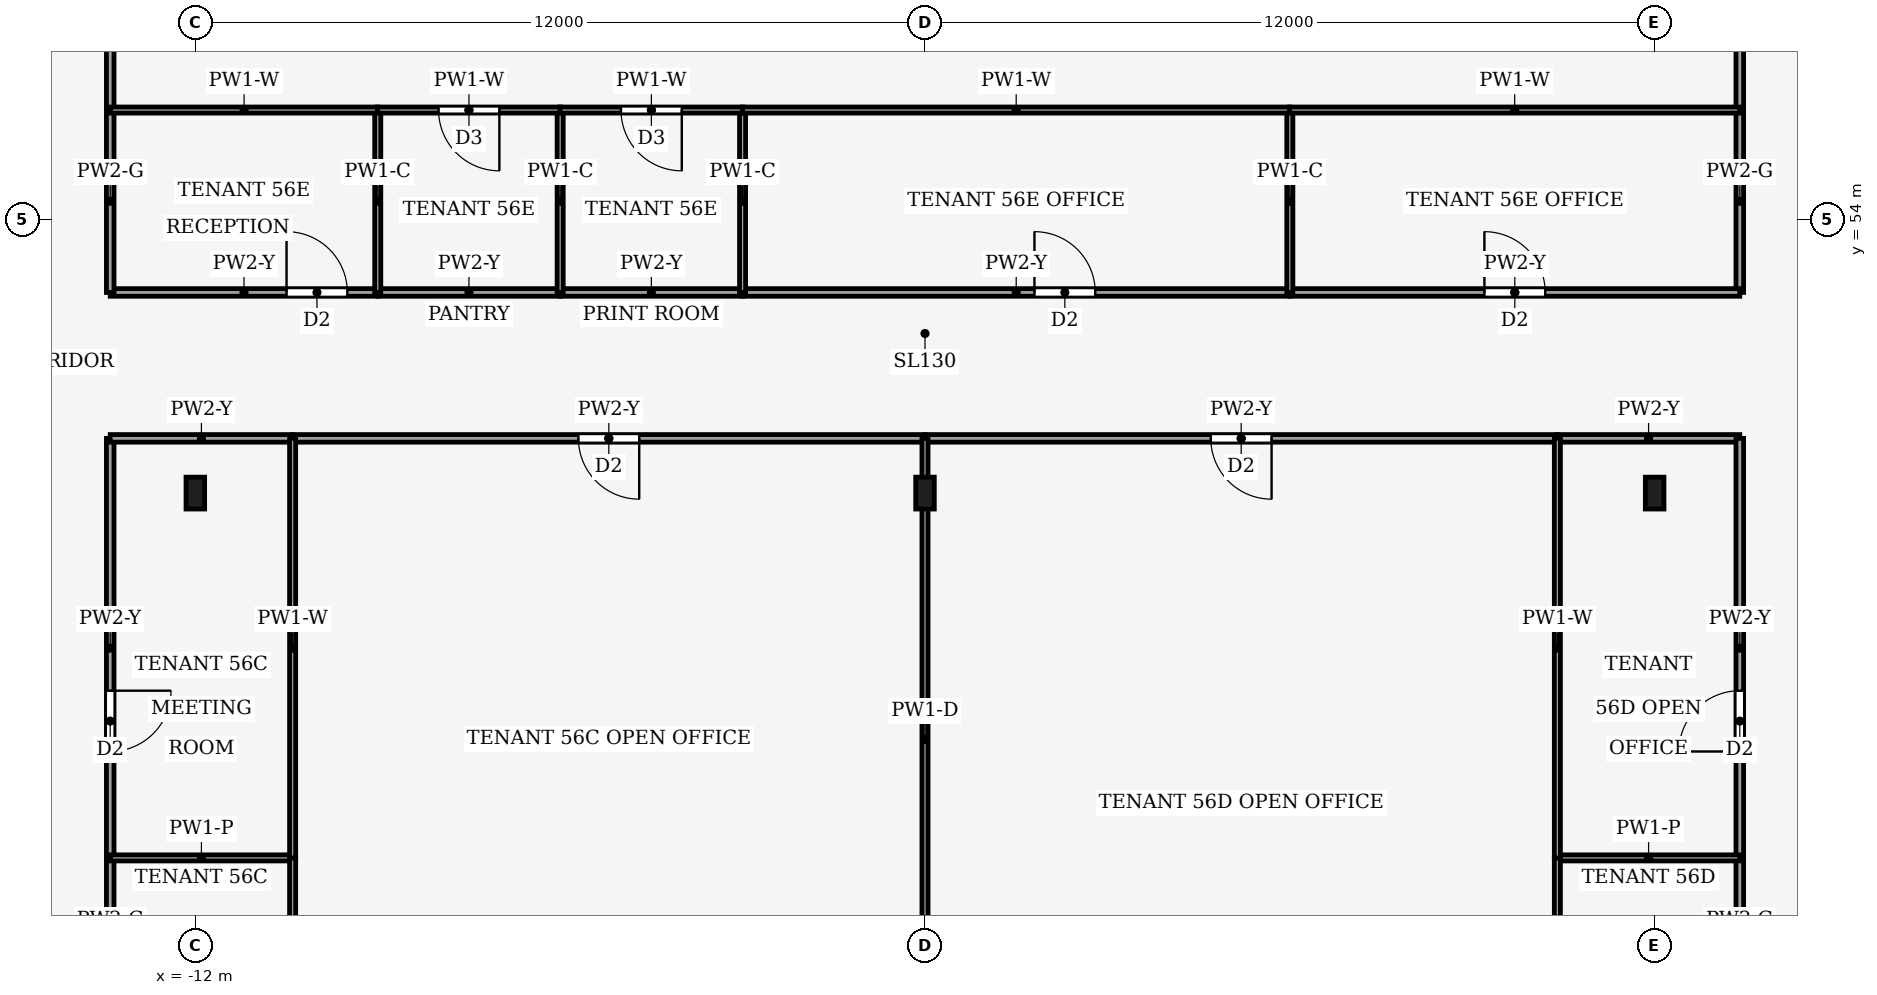
"""IFC4 building model, lengths in metres.
Left out: names, types, materials, properties, quantities, classifications, styles, units other than length and angle.
Written with IfcOpenShell. Run it as: python <this file> out.ifc"""

import sys

from ifc_helpers import new_model, si_unit, direction, frame, frame_2d, origin, origin_2d, place, context, subcontext, project, spatial, rectangle, i_section, extrude, element, fill, save


model = new_model("IFC4")
c1 = context("Model", 3, precision=1e-05, world=origin(), true_north=direction((0.0, 1.0)))
c2 = subcontext(c1, "Body", "Model", "MODEL_VIEW")
j1 = project(units=[si_unit("LENGTHUNIT", "METRE"), si_unit("PLANEANGLEUNIT", "RADIAN")], contexts=[c1])
p1 = place(None, origin())
s1 = spatial("IfcSite", under=j1, at=p1, CompositionType="ELEMENT")
p2 = place(p1, origin())
s2 = spatial("IfcBuilding", under=s1, at=p2, CompositionType="ELEMENT")
p3 = place(p2, frame((0.0, 0.0, 246.0)))
s3 = spatial("IfcBuildingStorey", under=s2, at=p3, CompositionType="ELEMENT", Elevation=246.0)
for number, where, z_axis, x_axis in (
    (1, (-12.0, 49.5, 0.0), (0.0, 0.0, 1.0), (1.0, 0.0, 0.0)),
    (2, (0.0, 49.5, 0.0), (0.0, 0.0, 1.0), (1.0, 0.0, 0.0)),
    (3, (12.0, 49.5, 0.0), (0.0, 0.0, 1.0), (1.0, 0.0, 0.0)),
):
    element("IfcColumn", number, at=place(p3, frame(where, z_axis=z_axis, x_axis=x_axis)), inside=s3, PredefinedType="COLUMN", context=c2, shape_type="SweptSolid", body=[
        extrude(i_section(OverallWidth=0.306, OverallDepth=0.524, WebThickness=0.012, FlangeThickness=0.04, FilletRadius=0.027, at=origin_2d()), origin(), (0.0, 0.0, 1.0), 4.0),
    ])
p4 = place(p3, frame((-13.4, 40.5, 0.0), z_axis=(0.0, 0.0, 1.0), x_axis=(0.0, 1.0, 0.0)))
e4 = element("IfcWall", 4, at=p4, inside=s3, PredefinedType="PARTITIONING", context=c2, shape_type="SweptSolid", body=[
    extrude(rectangle(XDim=3.0, YDim=0.125, at=frame_2d((1.5, 0.0))), origin(), (0.0, 0.0, 1.0), 3.87),
])
p5 = place(p3, frame((-13.4, 50.4, 0.0), z_axis=(0.0, 0.0, 1.0), x_axis=(0.0, -1.0, 0.0)))
e5 = element("IfcWall", 5, at=p5, inside=s3, PredefinedType="PARTITIONING", context=c2, shape_type="SweptSolid", body=[
    extrude(rectangle(XDim=6.9, YDim=0.125, at=frame_2d((3.45, 0.0))), origin(), (0.0, 0.0, 1.0), 3.24),
])
p6 = place(p5, frame((4.15, 0.0, 0.0)))
e6 = element("IfcOpeningElement", 6, at=p6, cuts=e5, PredefinedType="OPENING", context=c2, shape_type="SweptSolid", body=[
    extrude(rectangle(XDim=1.0, YDim=2.1, at=frame_2d((0.5, 1.05))), frame((0.0, 0.073, 0.0), z_axis=(0.0, -1.0, 0.0), x_axis=(1.0, 0.0, 0.0)), (0.0, 0.0, 1.0), 0.145),
])
p7 = place(p3, frame((-10.4, 50.4, 0.0), z_axis=(0.0, 0.0, 1.0), x_axis=(-1.0, 0.0, 0.0)))
e7 = element("IfcWall", 7, at=p7, inside=s3, PredefinedType="PARTITIONING", context=c2, shape_type="SweptSolid", body=[
    extrude(rectangle(XDim=3.0, YDim=0.125, at=frame_2d((1.5, 0.0))), origin(), (0.0, 0.0, 1.0), 3.24),
])
p8 = place(p3, frame((0.0, 50.4, 0.0), z_axis=(0.0, 0.0, 1.0), x_axis=(-1.0, 0.0, 0.0)))
e8 = element("IfcWall", 8, at=p8, inside=s3, PredefinedType="PARTITIONING", context=c2, shape_type="SweptSolid", body=[
    extrude(rectangle(XDim=10.4, YDim=0.125, at=frame_2d((5.2, 0.0))), origin(), (0.0, 0.0, 1.0), 3.24),
])
p9 = place(p8, frame((4.7, 0.0, 0.0)))
e9 = element("IfcOpeningElement", 9, at=p9, cuts=e8, PredefinedType="OPENING", context=c2, shape_type="SweptSolid", body=[
    extrude(rectangle(XDim=1.0, YDim=2.1, at=frame_2d((0.5, 1.05))), frame((0.0, 0.073, 0.0), z_axis=(0.0, -1.0, 0.0), x_axis=(1.0, 0.0, 0.0)), (0.0, 0.0, 1.0), 0.145),
])
p10 = place(p3, frame((13.4, 40.5, 0.0), z_axis=(0.0, 0.0, 1.0), x_axis=(0.0, 1.0, 0.0)))
e10 = element("IfcWall", 10, at=p10, inside=s3, PredefinedType="PARTITIONING", context=c2, shape_type="SweptSolid", body=[
    extrude(rectangle(XDim=3.0, YDim=0.125, at=frame_2d((1.5, 0.0))), origin(), (0.0, 0.0, 1.0), 3.87),
])
p11 = place(p3, frame((13.4, 50.4, 0.0), z_axis=(0.0, 0.0, 1.0), x_axis=(-1.0, 0.0, 0.0)))
e11 = element("IfcWall", 11, at=p11, inside=s3, PredefinedType="PARTITIONING", context=c2, shape_type="SweptSolid", body=[
    extrude(rectangle(XDim=3.0, YDim=0.125, at=frame_2d((1.5, 0.0))), origin(), (0.0, 0.0, 1.0), 3.24),
])
p12 = place(p3, frame((13.4, 43.5, 0.0), z_axis=(0.0, 0.0, 1.0), x_axis=(0.0, 1.0, 0.0)))
e12 = element("IfcWall", 12, at=p12, inside=s3, PredefinedType="PARTITIONING", context=c2, shape_type="SweptSolid", body=[
    extrude(rectangle(XDim=6.9, YDim=0.125, at=frame_2d((3.45, 0.0))), origin(), (0.0, 0.0, 1.0), 3.24),
])
p13 = place(p12, frame((1.75, 0.0, 0.0)))
e13 = element("IfcOpeningElement", 13, at=p13, cuts=e12, PredefinedType="OPENING", context=c2, shape_type="SweptSolid", body=[
    extrude(rectangle(XDim=1.0, YDim=2.1, at=frame_2d((0.5, 1.05))), frame((0.0, 0.073, 0.0), z_axis=(0.0, -1.0, 0.0), x_axis=(1.0, 0.0, 0.0)), (0.0, 0.0, 1.0), 0.145),
])
p14 = place(p3, frame((10.4, 50.4, 0.0), z_axis=(0.0, 0.0, 1.0), x_axis=(-1.0, 0.0, 0.0)))
e14 = element("IfcWall", 14, at=p14, inside=s3, PredefinedType="PARTITIONING", context=c2, shape_type="SweptSolid", body=[
    extrude(rectangle(XDim=10.4, YDim=0.125, at=frame_2d((5.2, 0.0))), origin(), (0.0, 0.0, 1.0), 3.24),
])
p15 = place(p14, frame((4.7, 0.0, 0.0)))
e15 = element("IfcOpeningElement", 15, at=p15, cuts=e14, PredefinedType="OPENING", context=c2, shape_type="SweptSolid", body=[
    extrude(rectangle(XDim=1.0, YDim=2.1, at=frame_2d((0.5, 1.05))), frame((0.0, 0.073, 0.0), z_axis=(0.0, -1.0, 0.0), x_axis=(1.0, 0.0, 0.0)), (0.0, 0.0, 1.0), 0.145),
])
p16 = place(p3, frame((-13.4, 52.8, 0.0), z_axis=(0.0, 0.0, 1.0), x_axis=(1.0, 0.0, 0.0)))
e16 = element("IfcWall", 16, at=p16, inside=s3, PredefinedType="PARTITIONING", context=c2, shape_type="SweptSolid", body=[
    extrude(rectangle(XDim=4.4, YDim=0.125, at=frame_2d((2.2, 0.0))), origin(), (0.0, 0.0, 1.0), 3.24),
])
p17 = place(p16, frame((2.9, 0.0, 0.0)))
e17 = element("IfcOpeningElement", 17, at=p17, cuts=e16, PredefinedType="OPENING", context=c2, shape_type="SweptSolid", body=[
    extrude(rectangle(XDim=1.0, YDim=2.1, at=frame_2d((0.5, 1.05))), frame((0.0, 0.073, 0.0), z_axis=(0.0, -1.0, 0.0), x_axis=(1.0, 0.0, 0.0)), (0.0, 0.0, 1.0), 0.145),
])
p18 = place(p3, frame((-13.4, 52.8, 0.0), z_axis=(0.0, 0.0, 1.0), x_axis=(0.0, 1.0, 0.0)))
e18 = element("IfcWall", 18, at=p18, inside=s3, PredefinedType="PARTITIONING", context=c2, shape_type="SweptSolid", body=[
    extrude(rectangle(XDim=3.0, YDim=0.125, at=frame_2d((1.5, 0.0))), origin(), (0.0, 0.0, 1.0), 3.87),
])
for number, where, z_axis, x_axis in (
    (19, (-6.0, 52.8, 0.0), (0.0, 0.0, 1.0), (-1.0, 0.0, 0.0)),
    (20, (-3.0, 52.8, 0.0), (0.0, 0.0, 1.0), (-1.0, 0.0, 0.0)),
):
    element("IfcWall", number, at=place(p3, frame(where, z_axis=z_axis, x_axis=x_axis)), inside=s3, PredefinedType="PARTITIONING", context=c2, shape_type="SweptSolid", body=[
        extrude(rectangle(XDim=3.0, YDim=0.125, at=frame_2d((1.5, 0.0))), origin(), (0.0, 0.0, 1.0), 3.24),
    ])
p19 = place(p3, frame((-3.0, 52.8, 0.0), z_axis=(0.0, 0.0, 1.0), x_axis=(1.0, 0.0, 0.0)))
e21 = element("IfcWall", 21, at=p19, inside=s3, PredefinedType="PARTITIONING", context=c2, shape_type="SweptSolid", body=[
    extrude(rectangle(XDim=9.0, YDim=0.125, at=frame_2d((4.5, 0.0))), origin(), (0.0, 0.0, 1.0), 3.24),
])
p20 = place(p19, frame((4.8, 0.0, 0.0)))
e22 = element("IfcOpeningElement", 22, at=p20, cuts=e21, PredefinedType="OPENING", context=c2, shape_type="SweptSolid", body=[
    extrude(rectangle(XDim=1.0, YDim=2.1, at=frame_2d((0.5, 1.05))), frame((0.0, 0.073, 0.0), z_axis=(0.0, -1.0, 0.0), x_axis=(1.0, 0.0, 0.0)), (0.0, 0.0, 1.0), 0.145),
])
p21 = place(p3, frame((13.4, 52.8, 0.0), z_axis=(0.0, 0.0, 1.0), x_axis=(0.0, 1.0, 0.0)))
e23 = element("IfcWall", 23, at=p21, inside=s3, PredefinedType="PARTITIONING", context=c2, shape_type="SweptSolid", body=[
    extrude(rectangle(XDim=3.0, YDim=0.125, at=frame_2d((1.5, 0.0))), origin(), (0.0, 0.0, 1.0), 3.87),
])
p22 = place(p3, frame((6.0, 52.8, 0.0), z_axis=(0.0, 0.0, 1.0), x_axis=(1.0, 0.0, 0.0)))
e24 = element("IfcWall", 24, at=p22, inside=s3, PredefinedType="PARTITIONING", context=c2, shape_type="SweptSolid", body=[
    extrude(rectangle(XDim=7.4, YDim=0.125, at=frame_2d((3.7, 0.0))), origin(), (0.0, 0.0, 1.0), 3.24),
])
p23 = place(p22, frame((3.2, 0.0, 0.0)))
e25 = element("IfcOpeningElement", 25, at=p23, cuts=e24, PredefinedType="OPENING", context=c2, shape_type="SweptSolid", body=[
    extrude(rectangle(XDim=1.0, YDim=2.1, at=frame_2d((0.5, 1.05))), frame((0.0, 0.073, 0.0), z_axis=(0.0, -1.0, 0.0), x_axis=(1.0, 0.0, 0.0)), (0.0, 0.0, 1.0), 0.145),
])
p24 = place(p3, frame((-13.4, 61.5, 0.0), z_axis=(0.0, 0.0, 1.0), x_axis=(0.0, -1.0, 0.0)))
e26 = element("IfcWall", 26, at=p24, inside=s3, PredefinedType="PARTITIONING", context=c2, shape_type="SweptSolid", body=[
    extrude(rectangle(XDim=5.7, YDim=0.125, at=frame_2d((2.85, 0.0))), origin(), (0.0, 0.0, 1.0), 3.87),
])
p25 = place(p24, frame((2.35, 0.0, 0.0)))
e27 = element("IfcOpeningElement", 27, at=p25, cuts=e26, PredefinedType="OPENING", context=c2, shape_type="SweptSolid", body=[
    extrude(rectangle(XDim=1.0, YDim=2.1, at=frame_2d((0.5, 1.05))), frame((0.0, 0.073, 0.0), z_axis=(0.0, -1.0, 0.0), x_axis=(1.0, 0.0, 0.0)), (0.0, 0.0, 1.0), 0.145),
])
p26 = place(p3, frame((13.4, 55.8, 0.0), z_axis=(0.0, 0.0, 1.0), x_axis=(0.0, 1.0, 0.0)))
e28 = element("IfcWall", 28, at=p26, inside=s3, PredefinedType="PARTITIONING", context=c2, shape_type="SweptSolid", body=[
    extrude(rectangle(XDim=5.7, YDim=0.125, at=frame_2d((2.85, 0.0))), origin(), (0.0, 0.0, 1.0), 3.87),
])
p27 = place(p3, frame((-10.4, 43.5, 0.0), z_axis=(0.0, 0.0, 1.0), x_axis=(-1.0, 0.0, 0.0)))
e29 = element("IfcWall", 29, at=p27, inside=s3, PredefinedType="PARTITIONING", context=c2, shape_type="SweptSolid", body=[
    extrude(rectangle(XDim=3.0, YDim=0.1, at=frame_2d((1.5, 0.0))), origin(), (0.0, 0.0, 1.0), 3.44),
])
p28 = place(p3, frame((-10.4, 40.5, 0.0), z_axis=(0.0, 0.0, 1.0), x_axis=(0.0, 1.0, 0.0)))
e30 = element("IfcWall", 30, at=p28, inside=s3, PredefinedType="PARTITIONING", context=c2, shape_type="SweptSolid", body=[
    extrude(rectangle(XDim=3.004, YDim=0.1, at=frame_2d((1.502, 0.0))), origin(), (0.0, 0.0, 1.0), 3.87),
])
p29 = place(p28, frame((1.002, 0.0, 0.0)))
e31 = element("IfcOpeningElement", 31, at=p29, cuts=e30, PredefinedType="OPENING", context=c2, shape_type="SweptSolid", body=[
    extrude(rectangle(XDim=1.0, YDim=2.1, at=frame_2d((0.5, 1.05))), frame((0.0, 0.06, 0.0), z_axis=(0.0, -1.0, 0.0), x_axis=(1.0, 0.0, 0.0)), (0.0, 0.0, 1.0), 0.12),
])
p30 = place(p3, frame((-10.4, 43.496, 0.0), z_axis=(0.0, 0.0, 1.0), x_axis=(0.0, 1.0, 0.0)))
e32 = element("IfcWall", 32, at=p30, inside=s3, PredefinedType="PARTITIONING", context=c2, shape_type="SweptSolid", body=[
    extrude(rectangle(XDim=6.904, YDim=0.1, at=frame_2d((3.452, 0.0))), origin(), (0.0, 0.0, 1.0), 3.24),
])
p31 = place(p3, frame((0.0, 40.496, 0.0), z_axis=(0.0, 0.0, 1.0), x_axis=(0.0, 1.0, 0.0)))
e33 = element("IfcWall", 33, at=p31, inside=s3, PredefinedType="PARTITIONING", context=c2, shape_type="SweptSolid", body=[
    extrude(rectangle(XDim=9.904, YDim=0.1, at=frame_2d((4.952, 0.0))), origin(), (0.0, 0.0, 1.0), 3.29),
])
p32 = place(p3, frame((13.4, 43.5, 0.0), z_axis=(0.0, 0.0, 1.0), x_axis=(-1.0, 0.0, 0.0)))
e34 = element("IfcWall", 34, at=p32, inside=s3, PredefinedType="PARTITIONING", context=c2, shape_type="SweptSolid", body=[
    extrude(rectangle(XDim=3.0, YDim=0.1, at=frame_2d((1.5, 0.0))), origin(), (0.0, 0.0, 1.0), 3.44),
])
p33 = place(p3, frame((10.4, 43.504, 0.0), z_axis=(0.0, 0.0, 1.0), x_axis=(0.0, -1.0, 0.0)))
e35 = element("IfcWall", 35, at=p33, inside=s3, PredefinedType="PARTITIONING", context=c2, shape_type="SweptSolid", body=[
    extrude(rectangle(XDim=3.008, YDim=0.1, at=frame_2d((1.504, 0.0))), origin(), (0.0, 0.0, 1.0), 3.87),
])
p34 = place(p33, frame((1.004, 0.0, 0.0)))
e36 = element("IfcOpeningElement", 36, at=p34, cuts=e35, PredefinedType="OPENING", context=c2, shape_type="SweptSolid", body=[
    extrude(rectangle(XDim=1.0, YDim=2.1, at=frame_2d((0.5, 1.05))), frame((0.0, 0.06, 0.0), z_axis=(0.0, -1.0, 0.0), x_axis=(1.0, 0.0, 0.0)), (0.0, 0.0, 1.0), 0.12),
])
p35 = place(p3, frame((10.4, 50.4, 0.0), z_axis=(0.0, 0.0, 1.0), x_axis=(0.0, -1.0, 0.0)))
e37 = element("IfcWall", 37, at=p35, inside=s3, PredefinedType="PARTITIONING", context=c2, shape_type="SweptSolid", body=[
    extrude(rectangle(XDim=6.904, YDim=0.1, at=frame_2d((3.452, 0.0))), origin(), (0.0, 0.0, 1.0), 3.24),
])
p36 = place(p3, frame((-9.0, 52.8, 0.0), z_axis=(0.0, 0.0, 1.0), x_axis=(0.0, 1.0, 0.0)))
e38 = element("IfcWall", 38, at=p36, inside=s3, PredefinedType="PARTITIONING", context=c2, shape_type="SweptSolid", body=[
    extrude(rectangle(XDim=3.0, YDim=0.1, at=frame_2d((1.5, 0.0))), origin(), (0.0, 0.0, 1.0), 3.87),
])
p37 = place(p3, frame((-8.996, 55.8, 0.0), z_axis=(0.0, 0.0, 1.0), x_axis=(-1.0, 0.0, 0.0)))
e39 = element("IfcWall", 39, at=p37, inside=s3, PredefinedType="PARTITIONING", context=c2, shape_type="SweptSolid", body=[
    extrude(rectangle(XDim=4.404, YDim=0.1, at=frame_2d((2.202, 0.0))), origin(), (0.0, 0.0, 1.0), 3.24),
])
p38 = place(p3, frame((-6.0, 52.8, 0.0), z_axis=(0.0, 0.0, 1.0), x_axis=(0.0, 1.0, 0.0)))
e40 = element("IfcWall", 40, at=p38, inside=s3, PredefinedType="PARTITIONING", context=c2, shape_type="SweptSolid", body=[
    extrude(rectangle(XDim=3.0, YDim=0.1, at=frame_2d((1.5, 0.0))), origin(), (0.0, 0.0, 1.0), 3.87),
])
p39 = place(p3, frame((-5.996, 55.8, 0.0), z_axis=(0.0, 0.0, 1.0), x_axis=(-1.0, 0.0, 0.0)))
e41 = element("IfcWall", 41, at=p39, inside=s3, PredefinedType="PARTITIONING", context=c2, shape_type="SweptSolid", body=[
    extrude(rectangle(XDim=3.008, YDim=0.1, at=frame_2d((1.504, 0.0))), origin(), (0.0, 0.0, 1.0), 3.24),
])
p40 = place(p39, frame((1.004, 0.0, 0.0)))
e42 = element("IfcOpeningElement", 42, at=p40, cuts=e41, PredefinedType="OPENING", context=c2, shape_type="SweptSolid", body=[
    extrude(rectangle(XDim=1.0, YDim=2.1, at=frame_2d((0.5, 1.05))), frame((0.0, 0.06, 0.0), z_axis=(0.0, -1.0, 0.0), x_axis=(1.0, 0.0, 0.0)), (0.0, 0.0, 1.0), 0.12),
])
p41 = place(p3, frame((-3.0, 52.8, 0.0), z_axis=(0.0, 0.0, 1.0), x_axis=(0.0, 1.0, 0.0)))
e43 = element("IfcWall", 43, at=p41, inside=s3, PredefinedType="PARTITIONING", context=c2, shape_type="SweptSolid", body=[
    extrude(rectangle(XDim=3.0, YDim=0.1, at=frame_2d((1.5, 0.0))), origin(), (0.0, 0.0, 1.0), 3.87),
])
p42 = place(p3, frame((-2.996, 55.8, 0.0), z_axis=(0.0, 0.0, 1.0), x_axis=(-1.0, 0.0, 0.0)))
e44 = element("IfcWall", 44, at=p42, inside=s3, PredefinedType="PARTITIONING", context=c2, shape_type="SweptSolid", body=[
    extrude(rectangle(XDim=3.008, YDim=0.1, at=frame_2d((1.504, 0.0))), origin(), (0.0, 0.0, 1.0), 3.24),
])
p43 = place(p42, frame((1.004, 0.0, 0.0)))
e45 = element("IfcOpeningElement", 45, at=p43, cuts=e44, PredefinedType="OPENING", context=c2, shape_type="SweptSolid", body=[
    extrude(rectangle(XDim=1.0, YDim=2.1, at=frame_2d((0.5, 1.05))), frame((0.0, 0.06, 0.0), z_axis=(0.0, -1.0, 0.0), x_axis=(1.0, 0.0, 0.0)), (0.0, 0.0, 1.0), 0.12),
])
p44 = place(p3, frame((6.0, 52.8, 0.0), z_axis=(0.0, 0.0, 1.0), x_axis=(0.0, 1.0, 0.0)))
e46 = element("IfcWall", 46, at=p44, inside=s3, PredefinedType="PARTITIONING", context=c2, shape_type="SweptSolid", body=[
    extrude(rectangle(XDim=3.0, YDim=0.1, at=frame_2d((1.5, 0.0))), origin(), (0.0, 0.0, 1.0), 3.87),
])
p45 = place(p3, frame((6.004, 55.8, 0.0), z_axis=(0.0, 0.0, 1.0), x_axis=(-1.0, 0.0, 0.0)))
e47 = element("IfcWall", 47, at=p45, inside=s3, PredefinedType="PARTITIONING", context=c2, shape_type="SweptSolid", body=[
    extrude(rectangle(XDim=9.008, YDim=0.1, at=frame_2d((4.504, 0.0))), origin(), (0.0, 0.0, 1.0), 3.24),
])
p46 = place(p3, frame((13.4, 55.8, 0.0), z_axis=(0.0, 0.0, 1.0), x_axis=(-1.0, 0.0, 0.0)))
e48 = element("IfcWall", 48, at=p46, inside=s3, PredefinedType="PARTITIONING", context=c2, shape_type="SweptSolid", body=[
    extrude(rectangle(XDim=7.404, YDim=0.1, at=frame_2d((3.702, 0.0))), origin(), (0.0, 0.0, 1.0), 3.24),
])
p47 = place(p6, origin())
e49 = element("IfcDoor", 49, at=p47, inside=s3, OperationType="SINGLE_SWING_RIGHT", PredefinedType="DOOR", context=c2, shape_type="SweptSolid", body=[
    extrude(rectangle(XDim=1.0, YDim=2.1, at=frame_2d((0.5, 1.05))), frame((0.0, 0.025, 0.0), z_axis=(0.0, -1.0, 0.0), x_axis=(1.0, 0.0, 0.0)), (0.0, 0.0, 1.0), 0.05),
])
fill(e6, e49)
p48 = place(p9, origin())
e50 = element("IfcDoor", 50, at=p48, inside=s3, OperationType="SINGLE_SWING_LEFT", PredefinedType="DOOR", context=c2, shape_type="SweptSolid", body=[
    extrude(rectangle(XDim=1.0, YDim=2.1, at=frame_2d((0.5, 1.05))), frame((0.0, 0.025, 0.0), z_axis=(0.0, -1.0, 0.0), x_axis=(1.0, 0.0, 0.0)), (0.0, 0.0, 1.0), 0.05),
])
fill(e9, e50)
p49 = place(p13, origin())
e51 = element("IfcDoor", 51, at=p49, inside=s3, OperationType="SINGLE_SWING_LEFT", PredefinedType="DOOR", context=c2, shape_type="SweptSolid", body=[
    extrude(rectangle(XDim=1.0, YDim=2.1, at=frame_2d((0.5, 1.05))), frame((0.0, 0.025, 0.0), z_axis=(0.0, -1.0, 0.0), x_axis=(1.0, 0.0, 0.0)), (0.0, 0.0, 1.0), 0.05),
])
fill(e13, e51)
p50 = place(p15, origin())
e52 = element("IfcDoor", 52, at=p50, inside=s3, OperationType="SINGLE_SWING_RIGHT", PredefinedType="DOOR", context=c2, shape_type="SweptSolid", body=[
    extrude(rectangle(XDim=1.0, YDim=2.1, at=frame_2d((0.5, 1.05))), frame((0.0, 0.025, 0.0), z_axis=(0.0, -1.0, 0.0), x_axis=(1.0, 0.0, 0.0)), (0.0, 0.0, 1.0), 0.05),
])
fill(e15, e52)
p51 = place(p17, origin())
e53 = element("IfcDoor", 53, at=p51, inside=s3, OperationType="SINGLE_SWING_RIGHT", PredefinedType="DOOR", context=c2, shape_type="SweptSolid", body=[
    extrude(rectangle(XDim=1.0, YDim=2.1, at=frame_2d((0.5, 1.05))), frame((0.0, 0.025, 0.0), z_axis=(0.0, -1.0, 0.0), x_axis=(1.0, 0.0, 0.0)), (0.0, 0.0, 1.0), 0.05),
])
fill(e17, e53)
p52 = place(p20, origin())
e54 = element("IfcDoor", 54, at=p52, inside=s3, OperationType="SINGLE_SWING_RIGHT", PredefinedType="DOOR", context=c2, shape_type="SweptSolid", body=[
    extrude(rectangle(XDim=1.0, YDim=2.1, at=frame_2d((0.5, 1.05))), frame((0.0, 0.025, 0.0), z_axis=(0.0, -1.0, 0.0), x_axis=(1.0, 0.0, 0.0)), (0.0, 0.0, 1.0), 0.05),
])
fill(e22, e54)
p53 = place(p23, origin())
e55 = element("IfcDoor", 55, at=p53, inside=s3, OperationType="SINGLE_SWING_LEFT", PredefinedType="DOOR", context=c2, shape_type="SweptSolid", body=[
    extrude(rectangle(XDim=1.0, YDim=2.1, at=frame_2d((0.5, 1.05))), frame((0.0, 0.025, 0.0), z_axis=(0.0, -1.0, 0.0), x_axis=(1.0, 0.0, 0.0)), (0.0, 0.0, 1.0), 0.05),
])
fill(e25, e55)
p54 = place(p40, origin())
e56 = element("IfcDoor", 56, at=p54, inside=s3, OperationType="SINGLE_SWING_RIGHT", PredefinedType="DOOR", context=c2, shape_type="SweptSolid", body=[
    extrude(rectangle(XDim=1.0, YDim=2.1, at=frame_2d((0.5, 1.05))), frame((0.0, 0.025, 0.0), z_axis=(0.0, -1.0, 0.0), x_axis=(1.0, 0.0, 0.0)), (0.0, 0.0, 1.0), 0.05),
])
fill(e42, e56)
p55 = place(p43, origin())
e57 = element("IfcDoor", 57, at=p55, inside=s3, OperationType="SINGLE_SWING_LEFT", PredefinedType="DOOR", context=c2, shape_type="SweptSolid", body=[
    extrude(rectangle(XDim=1.0, YDim=2.1, at=frame_2d((0.5, 1.05))), frame((0.0, 0.025, 0.0), z_axis=(0.0, -1.0, 0.0), x_axis=(1.0, 0.0, 0.0)), (0.0, 0.0, 1.0), 0.05),
])
fill(e45, e57)
save(model, sys.argv[1])
